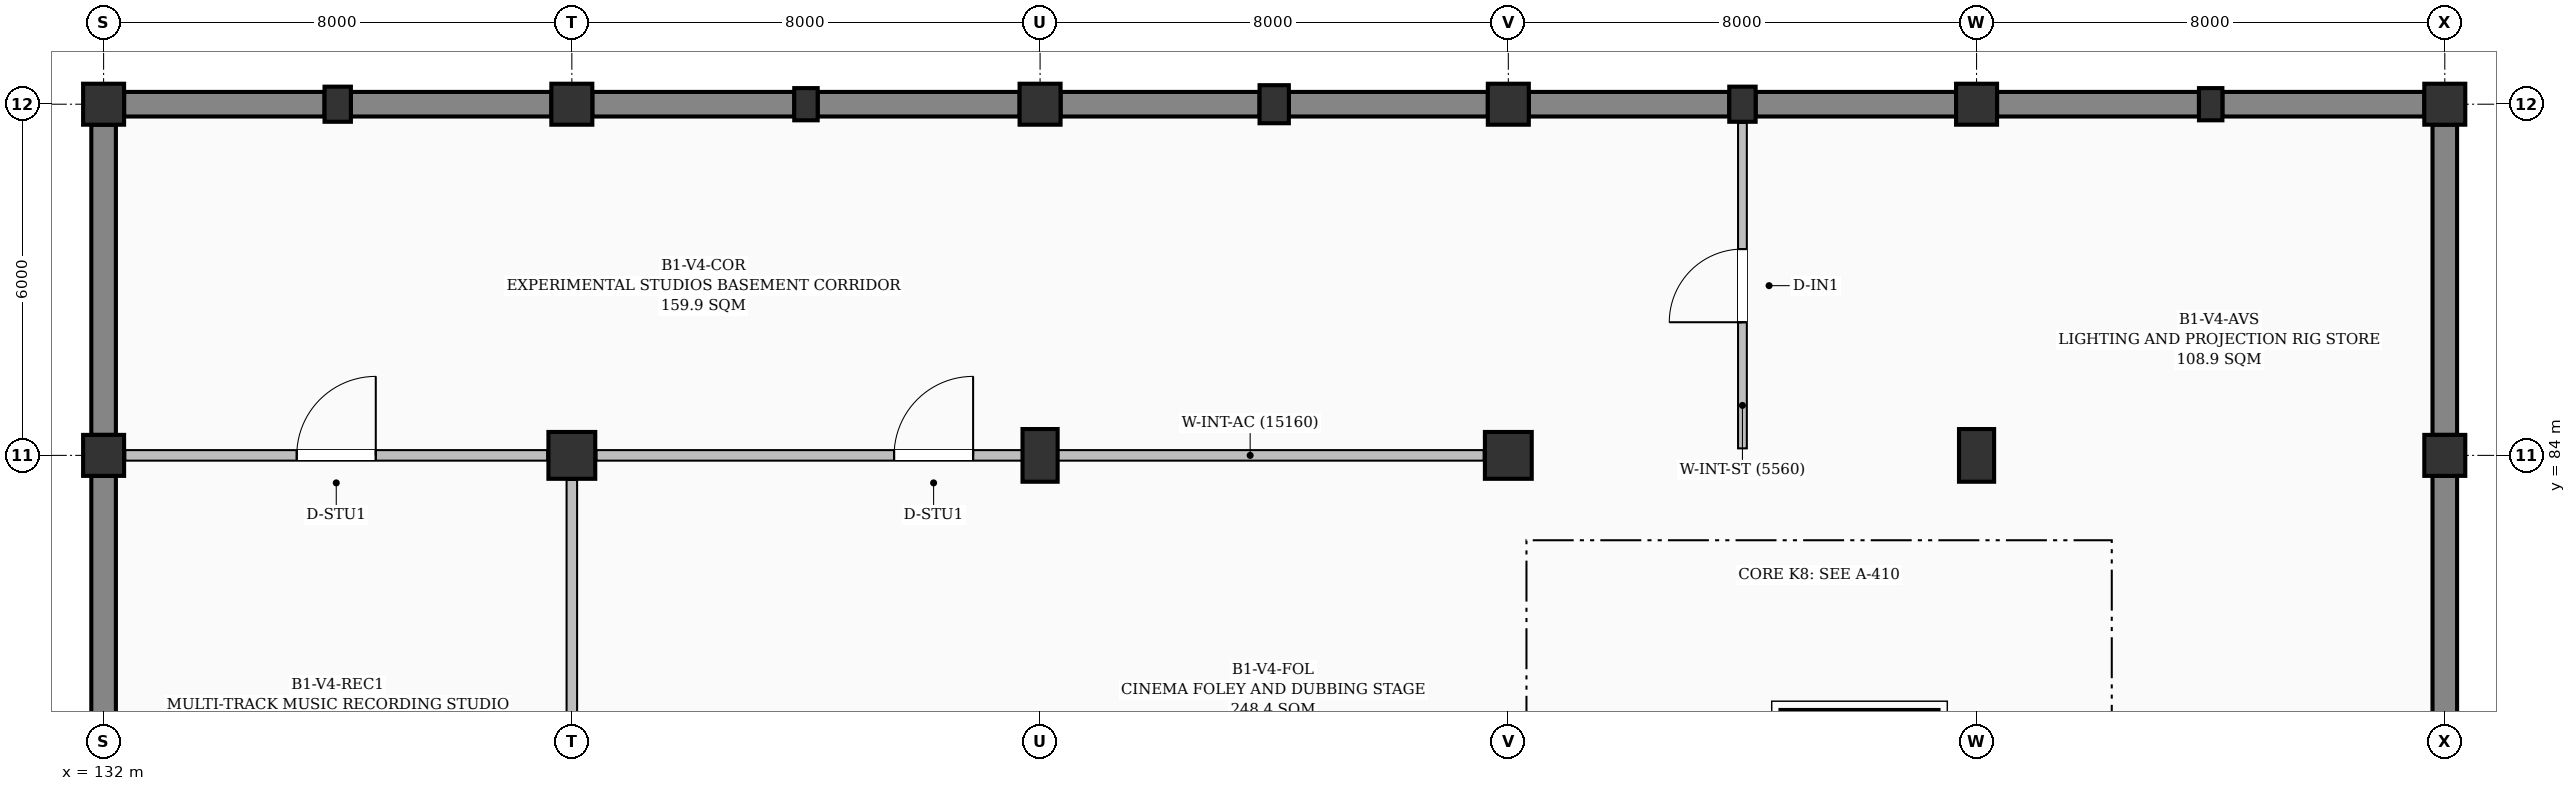
"""IFC4 building model, lengths in metres.
Left out: names, types, materials, properties, quantities, classifications, styles, units other than length and angle.
Written with IfcOpenShell. Run it as: python <this file> out.ifc"""

import sys

from ifc_helpers import new_model, si_unit, direction, frame, frame_2d, origin, origin_2d, place, context, subcontext, project, spatial, rectangle, extrude, element, fill, save


model = new_model("IFC4")
c1 = context("Model", 3, precision=1e-05, world=origin(), true_north=direction((0.0, 1.0)))
c2 = subcontext(c1, "Body", "Model", "MODEL_VIEW")
j1 = project(units=[si_unit("LENGTHUNIT", "METRE"), si_unit("PLANEANGLEUNIT", "RADIAN")], contexts=[c1])
p1 = place(None, origin())
s1 = spatial("IfcSite", under=j1, at=p1, CompositionType="ELEMENT")
p2 = place(p1, origin())
s2 = spatial("IfcBuilding", under=s1, at=p2, CompositionType="ELEMENT")
p3 = place(p2, frame((0.0, 0.0, -4.8)))
s3 = spatial("IfcBuildingStorey", under=s2, at=p3, CompositionType="ELEMENT", Elevation=-4.8)
for number, where, z_axis, x_axis in (
    (1, (132.0, 84.0, -0.38), (0.0, 0.0, 1.0), (1.0, 0.0, 0.0)),
    (2, (132.0, 90.0, -0.38), (0.0, 0.0, 1.0), (1.0, 0.0, 0.0)),
):
    element("IfcColumn", number, at=place(p3, frame(where, z_axis=z_axis, x_axis=x_axis)), inside=s3, PredefinedType="COLUMN", context=c2, shape_type="SweptSolid", body=[
        extrude(rectangle(XDim=0.7, YDim=0.7, at=origin_2d()), origin(), (0.0, 0.0, 1.0), 5.18),
    ])
p4 = place(p3, frame((136.0, 90.0, -0.38), z_axis=(0.0, 0.0, 1.0), x_axis=(1.0, 0.0, 0.0)))
e3 = element("IfcColumn", 3, at=p4, inside=s3, PredefinedType="PILASTER", context=c2, shape_type="SweptSolid", body=[
    extrude(rectangle(XDim=0.45, YDim=0.6, at=origin_2d()), origin(), (0.0, 0.0, 1.0), 5.18),
])
p5 = place(p3, frame((140.0, 84.0, -0.38), z_axis=(0.0, 0.0, 1.0), x_axis=(1.0, 0.0, 0.0)))
e4 = element("IfcColumn", 4, at=p5, inside=s3, PredefinedType="COLUMN", context=c2, shape_type="SweptSolid", body=[
    extrude(rectangle(XDim=0.8, YDim=0.8, at=origin_2d()), origin(), (0.0, 0.0, 1.0), 5.18),
])
p6 = place(p3, frame((140.0, 90.0, -0.38), z_axis=(0.0, 0.0, 1.0), x_axis=(1.0, 0.0, 0.0)))
e5 = element("IfcColumn", 5, at=p6, inside=s3, PredefinedType="COLUMN", context=c2, shape_type="SweptSolid", body=[
    extrude(rectangle(XDim=0.7, YDim=0.7, at=origin_2d()), origin(), (0.0, 0.0, 1.0), 5.18),
])
p7 = place(p3, frame((144.0, 90.0, -0.38), z_axis=(0.0, 0.0, 1.0), x_axis=(1.0, 0.0, 0.0)))
e6 = element("IfcColumn", 6, at=p7, inside=s3, PredefinedType="PILASTER", context=c2, shape_type="SweptSolid", body=[
    extrude(rectangle(XDim=0.4, YDim=0.55, at=origin_2d()), origin(), (0.0, 0.0, 1.0), 5.18),
])
p8 = place(p3, frame((148.0, 84.0, -0.38), z_axis=(0.0, 0.0, 1.0), x_axis=(1.0, 0.0, 0.0)))
e7 = element("IfcColumn", 7, at=p8, inside=s3, PredefinedType="COLUMN", context=c2, shape_type="SweptSolid", body=[
    extrude(rectangle(XDim=0.6, YDim=0.9, at=origin_2d()), origin(), (0.0, 0.0, 1.0), 5.18),
])
p9 = place(p3, frame((148.0, 90.0, -0.38), z_axis=(0.0, 0.0, 1.0), x_axis=(1.0, 0.0, 0.0)))
e8 = element("IfcColumn", 8, at=p9, inside=s3, PredefinedType="COLUMN", context=c2, shape_type="SweptSolid", body=[
    extrude(rectangle(XDim=0.7, YDim=0.7, at=origin_2d()), origin(), (0.0, 0.0, 1.0), 5.18),
])
p10 = place(p3, frame((152.0, 90.0, -0.38), z_axis=(0.0, 0.0, 1.0), x_axis=(1.0, 0.0, 0.0)))
e9 = element("IfcColumn", 9, at=p10, inside=s3, PredefinedType="PILASTER", context=c2, shape_type="SweptSolid", body=[
    extrude(rectangle(XDim=0.5, YDim=0.65, at=origin_2d()), origin(), (0.0, 0.0, 1.0), 5.18),
])
p11 = place(p3, frame((156.0, 84.0, -0.38), z_axis=(0.0, 0.0, 1.0), x_axis=(1.0, 0.0, 0.0)))
e10 = element("IfcColumn", 10, at=p11, inside=s3, PredefinedType="COLUMN", context=c2, shape_type="SweptSolid", body=[
    extrude(rectangle(XDim=0.8, YDim=0.8, at=origin_2d()), origin(), (0.0, 0.0, 1.0), 5.18),
])
p12 = place(p3, frame((156.0, 90.0, -0.38), z_axis=(0.0, 0.0, 1.0), x_axis=(1.0, 0.0, 0.0)))
e11 = element("IfcColumn", 11, at=p12, inside=s3, PredefinedType="COLUMN", context=c2, shape_type="SweptSolid", body=[
    extrude(rectangle(XDim=0.7, YDim=0.7, at=origin_2d()), origin(), (0.0, 0.0, 1.0), 5.18),
])
p13 = place(p3, frame((160.0, 90.0, -0.38), z_axis=(0.0, 0.0, 1.0), x_axis=(1.0, 0.0, 0.0)))
e12 = element("IfcColumn", 12, at=p13, inside=s3, PredefinedType="PILASTER", context=c2, shape_type="SweptSolid", body=[
    extrude(rectangle(XDim=0.45, YDim=0.6, at=origin_2d()), origin(), (0.0, 0.0, 1.0), 5.18),
])
p14 = place(p3, frame((164.0, 84.0, -0.38), z_axis=(0.0, 0.0, 1.0), x_axis=(1.0, 0.0, 0.0)))
e13 = element("IfcColumn", 13, at=p14, inside=s3, PredefinedType="COLUMN", context=c2, shape_type="SweptSolid", body=[
    extrude(rectangle(XDim=0.6, YDim=0.9, at=origin_2d()), origin(), (0.0, 0.0, 1.0), 5.18),
])
p15 = place(p3, frame((164.0, 90.0, -0.38), z_axis=(0.0, 0.0, 1.0), x_axis=(1.0, 0.0, 0.0)))
e14 = element("IfcColumn", 14, at=p15, inside=s3, PredefinedType="COLUMN", context=c2, shape_type="SweptSolid", body=[
    extrude(rectangle(XDim=0.7, YDim=0.7, at=origin_2d()), origin(), (0.0, 0.0, 1.0), 5.18),
])
p16 = place(p3, frame((168.0, 90.0, -0.38), z_axis=(0.0, 0.0, 1.0), x_axis=(1.0, 0.0, 0.0)))
e15 = element("IfcColumn", 15, at=p16, inside=s3, PredefinedType="PILASTER", context=c2, shape_type="SweptSolid", body=[
    extrude(rectangle(XDim=0.4, YDim=0.55, at=origin_2d()), origin(), (0.0, 0.0, 1.0), 5.18),
])
for number, where, z_axis, x_axis in (
    (16, (172.0, 84.0, -0.38), (0.0, 0.0, 1.0), (1.0, 0.0, 0.0)),
    (17, (172.0, 90.0, -0.38), (0.0, 0.0, 1.0), (1.0, 0.0, 0.0)),
):
    element("IfcColumn", number, at=place(p3, frame(where, z_axis=z_axis, x_axis=x_axis)), inside=s3, PredefinedType="COLUMN", context=c2, shape_type="SweptSolid", body=[
        extrude(rectangle(XDim=0.7, YDim=0.7, at=origin_2d()), origin(), (0.0, 0.0, 1.0), 5.18),
    ])
p17 = place(p3, frame((132.0, 76.35, 0.0), z_axis=(0.0, 0.0, 1.0), x_axis=(0.0, 1.0, 0.0)))
e18 = element("IfcWall", 18, at=p17, inside=s3, PredefinedType="USERDEFINED", context=c2, shape_type="SweptSolid", body=[
    extrude(rectangle(XDim=7.3, YDim=0.42, at=frame_2d((3.65, 0.0))), origin(), (0.0, 0.0, 1.0), 3.85),
])
p18 = place(p3, frame((132.0, 84.35, 0.0), z_axis=(0.0, 0.0, 1.0), x_axis=(0.0, 1.0, 0.0)))
e19 = element("IfcWall", 19, at=p18, inside=s3, PredefinedType="USERDEFINED", context=c2, shape_type="SweptSolid", body=[
    extrude(rectangle(XDim=5.3, YDim=0.42, at=frame_2d((2.65, 0.0))), origin(), (0.0, 0.0, 1.0), 3.85),
])
for number, where, z_axis, x_axis in (
    (20, (132.35, 90.0, 0.0), (0.0, 0.0, 1.0), (1.0, 0.0, 0.0)),
    (21, (136.225, 90.0, 0.0), (0.0, 0.0, 1.0), (1.0, 0.0, 0.0)),
):
    element("IfcWall", number, at=place(p3, frame(where, z_axis=z_axis, x_axis=x_axis)), inside=s3, PredefinedType="USERDEFINED", context=c2, shape_type="SweptSolid", body=[
        extrude(rectangle(XDim=3.425, YDim=0.42, at=frame_2d((1.712, 0.0))), origin(), (0.0, 0.0, 1.0), 3.85),
    ])
for number, where, z_axis, x_axis in (
    (22, (140.35, 90.0, 0.0), (0.0, 0.0, 1.0), (1.0, 0.0, 0.0)),
    (23, (144.2, 90.0, 0.0), (0.0, 0.0, 1.0), (1.0, 0.0, 0.0)),
):
    element("IfcWall", number, at=place(p3, frame(where, z_axis=z_axis, x_axis=x_axis)), inside=s3, PredefinedType="USERDEFINED", context=c2, shape_type="SweptSolid", body=[
        extrude(rectangle(XDim=3.45, YDim=0.42, at=frame_2d((1.725, 0.0))), origin(), (0.0, 0.0, 1.0), 3.85),
    ])
for number, where, z_axis, x_axis in (
    (24, (148.35, 90.0, 0.0), (0.0, 0.0, 1.0), (1.0, 0.0, 0.0)),
    (25, (152.25, 90.0, 0.0), (0.0, 0.0, 1.0), (1.0, 0.0, 0.0)),
):
    element("IfcWall", number, at=place(p3, frame(where, z_axis=z_axis, x_axis=x_axis)), inside=s3, PredefinedType="USERDEFINED", context=c2, shape_type="SweptSolid", body=[
        extrude(rectangle(XDim=3.4, YDim=0.42, at=frame_2d((1.7, 0.0))), origin(), (0.0, 0.0, 1.0), 3.85),
    ])
for number, where, z_axis, x_axis in (
    (26, (156.35, 90.0, 0.0), (0.0, 0.0, 1.0), (1.0, 0.0, 0.0)),
    (27, (160.225, 90.0, 0.0), (0.0, 0.0, 1.0), (1.0, 0.0, 0.0)),
):
    element("IfcWall", number, at=place(p3, frame(where, z_axis=z_axis, x_axis=x_axis)), inside=s3, PredefinedType="USERDEFINED", context=c2, shape_type="SweptSolid", body=[
        extrude(rectangle(XDim=3.425, YDim=0.42, at=frame_2d((1.712, 0.0))), origin(), (0.0, 0.0, 1.0), 3.85),
    ])
for number, where, z_axis, x_axis in (
    (28, (164.35, 90.0, 0.0), (0.0, 0.0, 1.0), (1.0, 0.0, 0.0)),
    (29, (168.2, 90.0, 0.0), (0.0, 0.0, 1.0), (1.0, 0.0, 0.0)),
):
    element("IfcWall", number, at=place(p3, frame(where, z_axis=z_axis, x_axis=x_axis)), inside=s3, PredefinedType="USERDEFINED", context=c2, shape_type="SweptSolid", body=[
        extrude(rectangle(XDim=3.45, YDim=0.42, at=frame_2d((1.725, 0.0))), origin(), (0.0, 0.0, 1.0), 3.85),
    ])
p19 = place(p3, frame((172.0, 89.65, 0.0), z_axis=(0.0, 0.0, 1.0), x_axis=(0.0, -1.0, 0.0)))
e30 = element("IfcWall", 30, at=p19, inside=s3, PredefinedType="USERDEFINED", context=c2, shape_type="SweptSolid", body=[
    extrude(rectangle(XDim=5.3, YDim=0.42, at=frame_2d((2.65, 0.0))), origin(), (0.0, 0.0, 1.0), 3.85),
])
p20 = place(p3, frame((172.0, 83.65, 0.0), z_axis=(0.0, 0.0, 1.0), x_axis=(0.0, -1.0, 0.0)))
e31 = element("IfcWall", 31, at=p20, inside=s3, PredefinedType="USERDEFINED", context=c2, shape_type="SweptSolid", body=[
    extrude(rectangle(XDim=7.3, YDim=0.42, at=frame_2d((3.65, 0.0))), origin(), (0.0, 0.0, 1.0), 3.85),
])
p21 = place(p3, frame((163.35, 79.5, -1.2), z_axis=(0.0, 0.0, 1.0), x_axis=(-1.0, 0.0, 0.0)))
e32 = element("IfcWall", 32, at=p21, inside=s3, PredefinedType="SHEAR", context=c2, shape_type="SweptSolid", body=[
    extrude(rectangle(XDim=2.7, YDim=0.3, at=frame_2d((1.35, 0.0))), origin(), (0.0, 0.0, 1.0), 5.7),
])
p22 = place(p3, frame((140.0, 68.42, 0.0), z_axis=(0.0, 0.0, 1.0), x_axis=(0.0, 1.0, 0.0)))
e33 = element("IfcWall", 33, at=p22, inside=s3, PredefinedType="PARTITIONING", context=c2, shape_type="SweptSolid", body=[
    extrude(rectangle(XDim=15.16, YDim=0.18, at=frame_2d((7.58, 0.0))), origin(), (0.0, 0.0, 1.0), 3.735),
])
p23 = place(p22, frame((5.086, 0.0, 0.0)))
e34 = element("IfcOpeningElement", 34, at=p23, cuts=e33, PredefinedType="OPENING", context=c2, shape_type="SweptSolid", body=[
    extrude(rectangle(XDim=1.35, YDim=2.2, at=frame_2d((0.675, 1.1))), frame((0.0, 0.1, 0.0), z_axis=(0.0, -1.0, 0.0), x_axis=(1.0, 0.0, 0.0)), (0.0, 0.0, 1.0), 0.2),
])
p24 = place(p3, frame((140.42, 84.0, 0.0), z_axis=(0.0, 0.0, 1.0), x_axis=(1.0, 0.0, 0.0)))
e35 = element("IfcWall", 35, at=p24, inside=s3, PredefinedType="PARTITIONING", context=c2, shape_type="SweptSolid", body=[
    extrude(rectangle(XDim=15.16, YDim=0.18, at=frame_2d((7.58, 0.0))), origin(), (0.0, 0.0, 1.0), 3.685),
])
p25 = place(p24, frame((5.086, 0.0, 0.0)))
e36 = element("IfcOpeningElement", 36, at=p25, cuts=e35, PredefinedType="OPENING", context=c2, shape_type="SweptSolid", body=[
    extrude(rectangle(XDim=1.35, YDim=2.2, at=frame_2d((0.675, 1.1))), frame((0.0, 0.1, 0.0), z_axis=(0.0, -1.0, 0.0), x_axis=(1.0, 0.0, 0.0)), (0.0, 0.0, 1.0), 0.2),
])
p26 = place(p3, frame((132.37, 84.0, 0.0), z_axis=(0.0, 0.0, 1.0), x_axis=(1.0, 0.0, 0.0)))
e37 = element("IfcWall", 37, at=p26, inside=s3, PredefinedType="PARTITIONING", context=c2, shape_type="SweptSolid", body=[
    extrude(rectangle(XDim=7.21, YDim=0.18, at=frame_2d((3.605, 0.0))), origin(), (0.0, 0.0, 1.0), 3.635),
])
p27 = place(p26, frame((2.93, 0.0, 0.0)))
e38 = element("IfcOpeningElement", 38, at=p27, cuts=e37, PredefinedType="OPENING", context=c2, shape_type="SweptSolid", body=[
    extrude(rectangle(XDim=1.35, YDim=2.2, at=frame_2d((0.675, 1.1))), frame((0.0, 0.1, 0.0), z_axis=(0.0, -1.0, 0.0), x_axis=(1.0, 0.0, 0.0)), (0.0, 0.0, 1.0), 0.2),
])
p28 = place(p3, frame((160.0, 84.12, 0.0), z_axis=(0.0, 0.0, 1.0), x_axis=(0.0, 1.0, 0.0)))
e39 = element("IfcWall", 39, at=p28, inside=s3, PredefinedType="PARTITIONING", context=c2, shape_type="SweptSolid", body=[
    extrude(rectangle(XDim=5.56, YDim=0.15, at=frame_2d((2.78, 0.0))), origin(), (0.0, 0.0, 1.0), 4.5),
])
p29 = place(p28, frame((2.155, 0.0, 0.0)))
e40 = element("IfcOpeningElement", 40, at=p29, cuts=e39, PredefinedType="OPENING", context=c2, shape_type="SweptSolid", body=[
    extrude(rectangle(XDim=1.25, YDim=2.15, at=frame_2d((0.625, 1.075))), frame((0.0, 0.085, 0.0), z_axis=(0.0, -1.0, 0.0), x_axis=(1.0, 0.0, 0.0)), (0.0, 0.0, 1.0), 0.17),
])
p30 = place(p25, origin())
e41 = element("IfcDoor", 41, at=p30, inside=s3, OperationType="SINGLE_SWING_RIGHT", PredefinedType="DOOR", context=c2, shape_type="SweptSolid", body=[
    extrude(rectangle(XDim=1.35, YDim=2.2, at=frame_2d((0.675, 1.1))), frame((0.0, 0.025, 0.0), z_axis=(0.0, -1.0, 0.0), x_axis=(1.0, 0.0, 0.0)), (0.0, 0.0, 1.0), 0.05),
])
fill(e36, e41)
p31 = place(p27, origin())
e42 = element("IfcDoor", 42, at=p31, inside=s3, OperationType="SINGLE_SWING_RIGHT", PredefinedType="DOOR", context=c2, shape_type="SweptSolid", body=[
    extrude(rectangle(XDim=1.35, YDim=2.2, at=frame_2d((0.675, 1.1))), frame((0.0, 0.025, 0.0), z_axis=(0.0, -1.0, 0.0), x_axis=(1.0, 0.0, 0.0)), (0.0, 0.0, 1.0), 0.05),
])
fill(e38, e42)
p32 = place(p29, origin())
e43 = element("IfcDoor", 43, at=p32, inside=s3, OperationType="SINGLE_SWING_LEFT", PredefinedType="DOOR", context=c2, shape_type="SweptSolid", body=[
    extrude(rectangle(XDim=1.25, YDim=2.15, at=frame_2d((0.625, 1.075))), frame((0.0, 0.025, 0.0), z_axis=(0.0, -1.0, 0.0), x_axis=(1.0, 0.0, 0.0)), (0.0, 0.0, 1.0), 0.05),
])
fill(e40, e43)
save(model, sys.argv[1])
